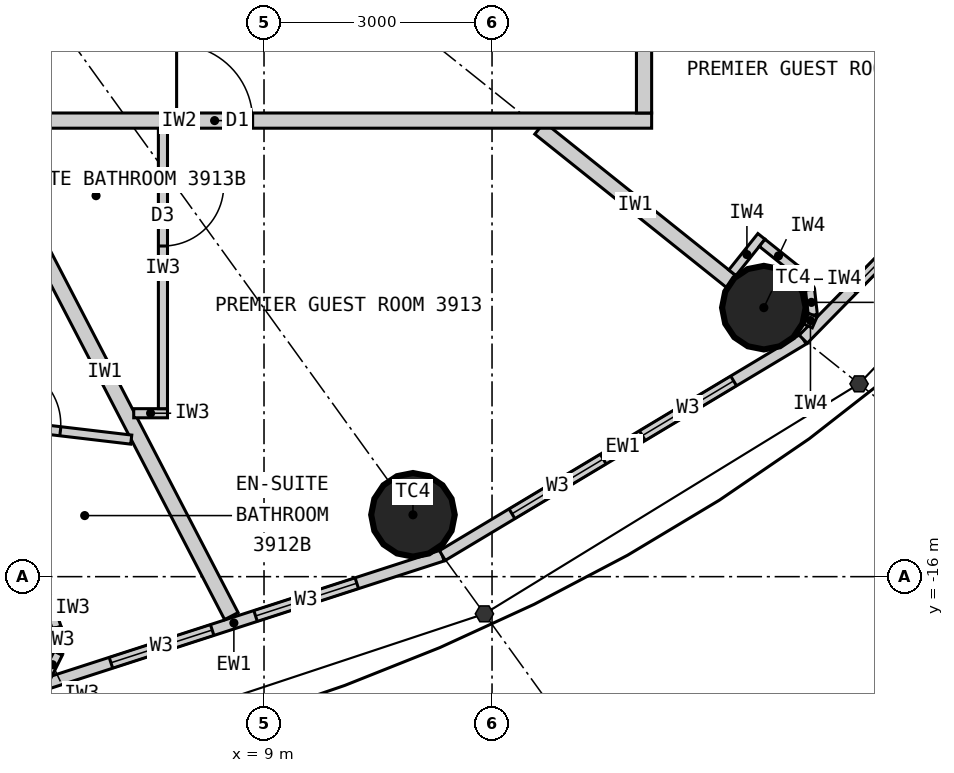
"""IFC4 building model, lengths in metres.
Left out: names, types, materials, properties, quantities, classifications, styles, units other than length and angle.
Written with IfcOpenShell. Run it as: python <this file> out.ifc"""

import sys

from ifc_helpers import new_model, si_unit, direction, frame, frame_2d, origin, origin_2d, place, context, subcontext, project, spatial, rectangle, circle, extrude, element, fill, save


model = new_model("IFC4")
c1 = context("Model", 3, precision=1e-05, world=origin(), true_north=direction((0.0, 1.0)))
c2 = subcontext(c1, "Body", "Model", "MODEL_VIEW")
j1 = project(units=[si_unit("LENGTHUNIT", "METRE"), si_unit("PLANEANGLEUNIT", "RADIAN")], contexts=[c1])
p1 = place(None, origin())
s1 = spatial("IfcSite", under=j1, at=p1, CompositionType="ELEMENT")
p2 = place(p1, origin())
s2 = spatial("IfcBuilding", under=s1, at=p2, CompositionType="ELEMENT")
p3 = place(p2, frame((0.0, 0.0, 150.0)))
s3 = spatial("IfcBuildingStorey", under=s2, at=p3, CompositionType="ELEMENT", Elevation=150.0)
for number, where, z_axis, x_axis in (
    (1, (10.96, -15.186, 0.0), (0.0, 0.0, 1.0), (1.0, 0.0, 0.0)),
    (2, (15.576, -12.461, 0.0), (0.0, 0.0, 1.0), (1.0, 0.0, 0.0)),
):
    element("IfcColumn", number, at=place(p3, frame(where, z_axis=z_axis, x_axis=x_axis)), inside=s3, PredefinedType="COLUMN", context=c2, shape_type="SweptSolid", body=[
        extrude(circle(Radius=0.55, at=origin_2d()), origin(), (0.0, 0.0, 1.0), 3.3),
    ])
p4 = place(p3, frame((5.86, -17.497, 0.0), z_axis=(0.0, 0.0, 1.0), x_axis=(0.951432482129, 0.307857486429, 0.0)))
e3 = element("IfcWall", 3, at=p4, inside=s3, PredefinedType="ELEMENTEDWALL", context=c2, shape_type="SweptSolid", body=[
    extrude(rectangle(XDim=5.766, YDim=0.15, at=frame_2d((2.883, 0.0))), origin(), (0.0, 0.0, 1.0), 3.12),
])
p5 = place(p4, frame((1.183, 0.0, 0.9)))
e4 = element("IfcOpeningElement", 4, at=p5, cuts=e3, PredefinedType="OPENING", context=c2, shape_type="SweptSolid", body=[
    extrude(rectangle(XDim=1.4, YDim=1.9, at=frame_2d((0.7, 0.95))), frame((0.0, 0.085, 0.0), z_axis=(0.0, -1.0, 0.0), x_axis=(1.0, 0.0, 0.0)), (0.0, 0.0, 1.0), 0.17),
])
p6 = place(p4, frame((3.183, 0.0, 0.9)))
e5 = element("IfcOpeningElement", 5, at=p6, cuts=e3, PredefinedType="OPENING", context=c2, shape_type="SweptSolid", body=[
    extrude(rectangle(XDim=1.4, YDim=1.9, at=frame_2d((0.7, 0.95))), frame((0.0, 0.085, 0.0), z_axis=(0.0, -1.0, 0.0), x_axis=(1.0, 0.0, 0.0)), (0.0, 0.0, 1.0), 0.17),
])
p7 = place(p3, frame((11.346, -15.722, 0.0), z_axis=(0.0, 0.0, 1.0), x_axis=(0.857695199231, 0.514158482587, 0.0)))
e6 = element("IfcWall", 6, at=p7, inside=s3, PredefinedType="ELEMENTEDWALL", context=c2, shape_type="SweptSolid", body=[
    extrude(rectangle(XDim=5.536, YDim=0.15, at=frame_2d((2.768, 0.0))), origin(), (0.0, 0.0, 1.0), 3.12),
])
p8 = place(p7, frame((1.068, 0.0, 0.9)))
e7 = element("IfcOpeningElement", 7, at=p8, cuts=e6, PredefinedType="OPENING", context=c2, shape_type="SweptSolid", body=[
    extrude(rectangle(XDim=1.4, YDim=1.9, at=frame_2d((0.7, 0.95))), frame((0.0, 0.085, 0.0), z_axis=(0.0, -1.0, 0.0), x_axis=(1.0, 0.0, 0.0)), (0.0, 0.0, 1.0), 0.17),
])
p9 = place(p7, frame((3.068, 0.0, 0.9)))
e8 = element("IfcOpeningElement", 8, at=p9, cuts=e6, PredefinedType="OPENING", context=c2, shape_type="SweptSolid", body=[
    extrude(rectangle(XDim=1.4, YDim=1.9, at=frame_2d((0.7, 0.95))), frame((0.0, 0.085, 0.0), z_axis=(0.0, -1.0, 0.0), x_axis=(1.0, 0.0, 0.0)), (0.0, 0.0, 1.0), 0.17),
])
p10 = place(p3, frame((16.095, -12.876, 0.0), z_axis=(0.0, 0.0, 1.0), x_axis=(0.700727467776, 0.71342905457, 0.0)))
e9 = element("IfcWall", 9, at=p10, inside=s3, PredefinedType="ELEMENTEDWALL", context=c2, shape_type="SweptSolid", body=[
    extrude(rectangle(XDim=5.247, YDim=0.15, at=frame_2d((2.624, 0.0))), origin(), (0.0, 0.0, 1.0), 3.12),
])
p11 = place(p10, frame((0.924, 0.0, 0.9)))
e10 = element("IfcOpeningElement", 10, at=p11, cuts=e9, PredefinedType="OPENING", context=c2, shape_type="SweptSolid", body=[
    extrude(rectangle(XDim=1.4, YDim=1.9, at=frame_2d((0.7, 0.95))), frame((0.0, 0.085, 0.0), z_axis=(0.0, -1.0, 0.0), x_axis=(1.0, 0.0, 0.0)), (0.0, 0.0, 1.0), 0.17),
])
p12 = place(p10, frame((2.924, 0.0, 0.9)))
e11 = element("IfcOpeningElement", 11, at=p12, cuts=e9, PredefinedType="OPENING", context=c2, shape_type="SweptSolid", body=[
    extrude(rectangle(XDim=1.4, YDim=1.9, at=frame_2d((0.7, 0.95))), frame((0.0, 0.085, 0.0), z_axis=(0.0, -1.0, 0.0), x_axis=(1.0, 0.0, 0.0)), (0.0, 0.0, 1.0), 0.17),
])
p13 = place(p3, frame((5.24, -10.1, 0.0), z_axis=(0.0, 0.0, 1.0), x_axis=(0.460532965373, -0.887642601391, 0.0)))
e12 = element("IfcWall", 12, at=p13, inside=s3, PredefinedType="PARTITIONING", context=c2, shape_type="SweptSolid", body=[
    extrude(rectangle(XDim=7.231, YDim=0.2, at=frame_2d((3.616, 0.0))), origin(), (0.0, 0.0, 1.0), 3.12),
])
p14 = place(p3, frame((12.625, -10.1, 0.0), z_axis=(0.0, 0.0, 1.0), x_axis=(0.780876185034, -0.624685827954, 0.0)))
e13 = element("IfcWall", 13, at=p14, inside=s3, PredefinedType="PARTITIONING", context=c2, shape_type="SweptSolid", body=[
    extrude(rectangle(XDim=3.229, YDim=0.2, at=frame_2d((1.615, 0.0))), origin(), (0.0, 0.0, 1.0), 2.42),
])
p15 = place(p3, frame((7.253, -14.197, 0.0), z_axis=(0.0, 0.0, 1.0), x_axis=(-0.993128188393, 0.117031625725, 0.0)))
e14 = element("IfcWall", 14, at=p15, inside=s3, PredefinedType="PARTITIONING", context=c2, shape_type="SweptSolid", body=[
    extrude(rectangle(XDim=2.678, YDim=0.12, at=frame_2d((1.339, 0.0))), origin(), (0.0, 0.0, 1.0), 3.12),
])
p16 = place(p15, frame((0.939, 0.0, 0.0)))
e15 = element("IfcOpeningElement", 15, at=p16, cuts=e14, PredefinedType="OPENING", context=c2, shape_type="SweptSolid", body=[
    extrude(rectangle(XDim=0.8, YDim=2.1, at=frame_2d((0.4, 1.05))), frame((0.0, 0.07, 0.0), z_axis=(0.0, -1.0, 0.0), x_axis=(1.0, 0.0, 0.0)), (0.0, 0.0, 1.0), 0.14),
])
p17 = place(p3, frame((6.097, -16.149, 0.0), z_axis=(0.0, 0.0, 1.0), x_axis=(0.317292604854, -0.948327687514, 0.0)))
e16 = element("IfcWall", 16, at=p17, inside=s3, PredefinedType="PARTITIONING", context=c2, shape_type="SweptSolid", body=[
    extrude(rectangle(XDim=0.55, YDim=0.12, at=frame_2d((0.275, 0.0))), origin(), (0.0, 0.0, 1.0), 3.12),
])
for number, where, z_axis, x_axis in (
    (17, (6.271, -16.67, 0.0), (0.0, 0.0, 1.0), (0.061, -0.998, 0.0)),
    (18, (6.292, -17.007, 0.0), (0.0, 0.0, 1.0), (-0.445, -0.895, 0.0)),
):
    element("IfcWall", number, at=place(p3, frame(where, z_axis=z_axis, x_axis=x_axis)), inside=s3, PredefinedType="PARTITIONING", context=c2, shape_type="SweptSolid", body=[
        extrude(rectangle(XDim=0.338, YDim=0.12, at=frame_2d((0.169, 0.0))), origin(), (0.0, 0.0, 1.0), 3.12),
    ])
p18 = place(p3, frame((7.286, -13.85, 0.0), z_axis=(0.0, 0.0, 1.0), x_axis=(1.0, 0.0, 0.0)))
e19 = element("IfcWall", 19, at=p18, inside=s3, PredefinedType="PARTITIONING", context=c2, shape_type="SweptSolid", body=[
    extrude(rectangle(XDim=0.444, YDim=0.12, at=frame_2d((0.222, 0.0))), origin(), (0.0, 0.0, 1.0), 3.12),
])
p19 = place(p3, frame((7.67, -10.1, 0.0), z_axis=(0.0, 0.0, 1.0), x_axis=(0.0, -1.0, 0.0)))
e20 = element("IfcWall", 20, at=p19, inside=s3, PredefinedType="PARTITIONING", context=c2, shape_type="SweptSolid", body=[
    extrude(rectangle(XDim=3.69, YDim=0.12, at=frame_2d((1.845, 0.0))), origin(), (0.0, 0.0, 1.0), 3.12),
])
p20 = place(p19, frame((0.75, 0.0, 0.0)))
e21 = element("IfcOpeningElement", 21, at=p20, cuts=e20, PredefinedType="OPENING", context=c2, shape_type="SweptSolid", body=[
    extrude(rectangle(XDim=0.8, YDim=2.1, at=frame_2d((0.4, 1.05))), frame((0.0, 0.07, 0.0), z_axis=(0.0, -1.0, 0.0), x_axis=(1.0, 0.0, 0.0)), (0.0, 0.0, 1.0), 0.14),
])
p21 = place(p3, frame((14.1, -10.0, 0.0), z_axis=(0.0, 0.0, 1.0), x_axis=(-1.0, 0.0, 0.0)))
e22 = element("IfcWall", 22, at=p21, inside=s3, PredefinedType="PARTITIONING", context=c2, shape_type="SweptSolid", body=[
    extrude(rectangle(XDim=12.43, YDim=0.2, at=frame_2d((6.215, 0.0))), origin(), (0.0, 0.0, 1.0), 3.12),
])
p22 = place(p21, frame((5.25, 0.0, 0.0)))
e23 = element("IfcOpeningElement", 23, at=p22, cuts=e22, PredefinedType="OPENING", context=c2, shape_type="SweptSolid", body=[
    extrude(rectangle(XDim=1.0, YDim=2.2, at=frame_2d((0.5, 1.1))), frame((0.0, 0.11, 0.0), z_axis=(0.0, -1.0, 0.0), x_axis=(1.0, 0.0, 0.0)), (0.0, 0.0, 1.0), 0.22),
])
p23 = place(p3, frame((14.0, -9.9, 0.0), z_axis=(0.0, 0.0, 1.0), x_axis=(0.0, 1.0, 0.0)))
e24 = element("IfcWall", 24, at=p23, inside=s3, PredefinedType="PARTITIONING", context=c2, shape_type="SweptSolid", body=[
    extrude(rectangle(XDim=8.23, YDim=0.2, at=frame_2d((4.115, 0.0))), origin(), (0.0, 0.0, 1.0), 3.12),
])
p24 = place(p23, frame((1.678, 0.0, 0.0)))
e25 = element("IfcOpeningElement", 25, at=p24, cuts=e24, PredefinedType="OPENING", context=c2, shape_type="SweptSolid", body=[
    extrude(rectangle(XDim=1.0, YDim=2.2, at=frame_2d((0.5, 1.1))), frame((0.0, 0.11, 0.0), z_axis=(0.0, -1.0, 0.0), x_axis=(1.0, 0.0, 0.0)), (0.0, 0.0, 1.0), 0.22),
])
p25 = place(p3, frame((15.162, -12.002, 0.0), z_axis=(0.0, 0.0, 1.0), x_axis=(0.624597762427, 0.780946627607, 0.0)))
e26 = element("IfcWall", 26, at=p25, inside=s3, PredefinedType="PARTITIONING", context=c2, shape_type="SweptSolid", body=[
    extrude(rectangle(XDim=0.612, YDim=0.12, at=frame_2d((0.306, 0.0))), origin(), (0.0, 0.0, 1.0), 3.12),
])
p26 = place(p3, frame((15.554, -11.608, 0.0), z_axis=(0.0, 0.0, 1.0), x_axis=(0.780695577787, -0.624911525597, 0.0)))
e27 = element("IfcWall", 27, at=p26, inside=s3, PredefinedType="PARTITIONING", context=c2, shape_type="SweptSolid", body=[
    extrude(rectangle(XDim=0.55, YDim=0.12, at=frame_2d((0.275, 0.0))), origin(), (0.0, 0.0, 1.0), 3.12),
])
p27 = place(p3, frame((15.984, -11.952, 0.0), z_axis=(0.0, 0.0, 1.0), x_axis=(0.592335221171, -0.805691619517, 0.0)))
e28 = element("IfcWall", 28, at=p27, inside=s3, PredefinedType="PARTITIONING", context=c2, shape_type="SweptSolid", body=[
    extrude(rectangle(XDim=0.338, YDim=0.12, at=frame_2d((0.169, 0.0))), origin(), (0.0, 0.0, 1.0), 3.12),
])
p28 = place(p3, frame((16.184, -12.224, 0.0), z_axis=(0.0, 0.0, 1.0), x_axis=(0.110669692975, -0.993857242795, 0.0)))
e29 = element("IfcWall", 29, at=p28, inside=s3, PredefinedType="PARTITIONING", context=c2, shape_type="SweptSolid", body=[
    extrude(rectangle(XDim=0.337, YDim=0.12, at=frame_2d((0.169, 0.0))), origin(), (0.0, 0.0, 1.0), 3.12),
])
p29 = place(p3, frame((16.221, -12.559, 0.0), z_axis=(0.0, 0.0, 1.0), x_axis=(-0.401064416249, -0.916049853457, 0.0)))
e30 = element("IfcWall", 30, at=p29, inside=s3, PredefinedType="PARTITIONING", context=c2, shape_type="SweptSolid", body=[
    extrude(rectangle(XDim=0.156, YDim=0.12, at=frame_2d((0.078, 0.0))), origin(), (0.0, 0.0, 1.0), 3.12),
])
p30 = place(p5, origin())
e31 = element("IfcWindow", 31, at=p30, inside=s3, PartitioningType="SINGLE_PANEL", PredefinedType="WINDOW", context=c2, shape_type="SweptSolid", body=[
    extrude(rectangle(XDim=1.4, YDim=1.9, at=frame_2d((0.7, 0.95))), frame((0.0, 0.03, 0.0), z_axis=(0.0, -1.0, 0.0), x_axis=(1.0, 0.0, 0.0)), (0.0, 0.0, 1.0), 0.06),
])
fill(e4, e31)
p31 = place(p6, origin())
e32 = element("IfcWindow", 32, at=p31, inside=s3, PartitioningType="SINGLE_PANEL", PredefinedType="WINDOW", context=c2, shape_type="SweptSolid", body=[
    extrude(rectangle(XDim=1.4, YDim=1.9, at=frame_2d((0.7, 0.95))), frame((0.0, 0.03, 0.0), z_axis=(0.0, -1.0, 0.0), x_axis=(1.0, 0.0, 0.0)), (0.0, 0.0, 1.0), 0.06),
])
fill(e5, e32)
p32 = place(p8, origin())
e33 = element("IfcWindow", 33, at=p32, inside=s3, PartitioningType="SINGLE_PANEL", PredefinedType="WINDOW", context=c2, shape_type="SweptSolid", body=[
    extrude(rectangle(XDim=1.4, YDim=1.9, at=frame_2d((0.7, 0.95))), frame((0.0, 0.03, 0.0), z_axis=(0.0, -1.0, 0.0), x_axis=(1.0, 0.0, 0.0)), (0.0, 0.0, 1.0), 0.06),
])
fill(e7, e33)
p33 = place(p9, origin())
e34 = element("IfcWindow", 34, at=p33, inside=s3, PartitioningType="SINGLE_PANEL", PredefinedType="WINDOW", context=c2, shape_type="SweptSolid", body=[
    extrude(rectangle(XDim=1.4, YDim=1.9, at=frame_2d((0.7, 0.95))), frame((0.0, 0.03, 0.0), z_axis=(0.0, -1.0, 0.0), x_axis=(1.0, 0.0, 0.0)), (0.0, 0.0, 1.0), 0.06),
])
fill(e8, e34)
p34 = place(p11, origin())
e35 = element("IfcWindow", 35, at=p34, inside=s3, PartitioningType="SINGLE_PANEL", PredefinedType="WINDOW", context=c2, shape_type="SweptSolid", body=[
    extrude(rectangle(XDim=1.4, YDim=1.9, at=frame_2d((0.7, 0.95))), frame((0.0, 0.03, 0.0), z_axis=(0.0, -1.0, 0.0), x_axis=(1.0, 0.0, 0.0)), (0.0, 0.0, 1.0), 0.06),
])
fill(e10, e35)
p35 = place(p16, origin())
e36 = element("IfcDoor", 36, at=p35, inside=s3, OperationType="SINGLE_SWING_RIGHT", PredefinedType="DOOR", context=c2, shape_type="SweptSolid", body=[
    extrude(rectangle(XDim=0.8, YDim=2.1, at=frame_2d((0.4, 1.05))), frame((0.0, 0.025, 0.0), z_axis=(0.0, -1.0, 0.0), x_axis=(1.0, 0.0, 0.0)), (0.0, 0.0, 1.0), 0.05),
])
fill(e15, e36)
p36 = place(p20, origin())
e37 = element("IfcDoor", 37, at=p36, inside=s3, OperationType="SINGLE_SWING_LEFT", PredefinedType="DOOR", context=c2, shape_type="SweptSolid", body=[
    extrude(rectangle(XDim=0.8, YDim=2.1, at=frame_2d((0.4, 1.05))), frame((0.0, 0.025, 0.0), z_axis=(0.0, -1.0, 0.0), x_axis=(1.0, 0.0, 0.0)), (0.0, 0.0, 1.0), 0.05),
])
fill(e21, e37)
p37 = place(p22, origin())
e38 = element("IfcDoor", 38, at=p37, inside=s3, OperationType="SINGLE_SWING_RIGHT", PredefinedType="DOOR", context=c2, shape_type="SweptSolid", body=[
    extrude(rectangle(XDim=1.0, YDim=2.2, at=frame_2d((0.5, 1.1))), frame((0.0, 0.025, 0.0), z_axis=(0.0, -1.0, 0.0), x_axis=(1.0, 0.0, 0.0)), (0.0, 0.0, 1.0), 0.05),
])
fill(e23, e38)
save(model, sys.argv[1])
